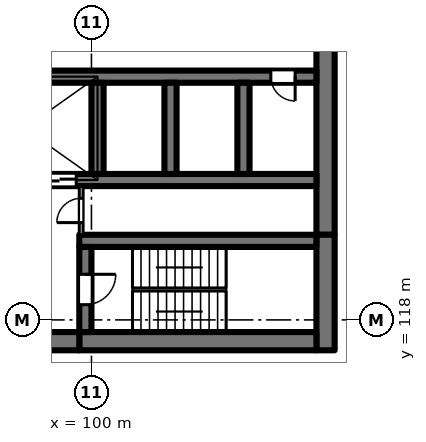
"""IFC4 building model, lengths in metres.
Left out: names, types, materials, properties, quantities, classifications, styles, units other than length and angle.
Written with IfcOpenShell. Run it as: python <this file> out.ifc"""

import sys

from ifc_helpers import new_model, si_unit, direction, frame, frame_2d, origin, place, context, subcontext, project, spatial, rectangle, extrude, element, fill, save


model = new_model("IFC4")
c1 = context("Model", 3, precision=1e-05, world=origin(), true_north=direction((0.0, 1.0)))
c2 = subcontext(c1, "Body", "Model", "MODEL_VIEW")
j1 = project(units=[si_unit("LENGTHUNIT", "METRE"), si_unit("PLANEANGLEUNIT", "RADIAN")], contexts=[c1])
p1 = place(None, origin())
s1 = spatial("IfcSite", under=j1, at=p1, CompositionType="ELEMENT")
p2 = place(p1, origin())
s2 = spatial("IfcBuilding", under=s1, at=p2, CompositionType="ELEMENT")
p3 = place(p2, frame((0.0, 0.0, 89.0)))
s3 = spatial("IfcBuildingStorey", under=s2, at=p3, CompositionType="ELEMENT", Elevation=89.0)
p4 = place(p3, frame((107.7, 135.2, 0.0), z_axis=(0.0, 0.0, 1.0), x_axis=(0.0, -1.0, 0.0)))
e1 = element("IfcWall", 1, at=p4, inside=s3, PredefinedType="SHEAR", context=c2, shape_type="SweptSolid", body=[
    extrude(rectangle(XDim=14.4, YDim=0.6, at=frame_2d((7.2, 0.0))), origin(), (0.0, 0.0, 1.0), 4.0),
])
p5 = place(p3, frame((107.7, 120.8, 0.0), z_axis=(0.0, 0.0, 1.0), x_axis=(0.0, -1.0, 0.0)))
e2 = element("IfcWall", 2, at=p5, inside=s3, PredefinedType="SHEAR", context=c2, shape_type="SweptSolid", body=[
    extrude(rectangle(XDim=3.8, YDim=0.6, at=frame_2d((1.9, 0.0))), origin(), (0.0, 0.0, 1.0), 4.0),
])
p6 = place(p3, frame((107.4, 117.3, 0.0), z_axis=(0.0, 0.0, 1.0), x_axis=(-1.0, 0.0, 0.0)))
e3 = element("IfcWall", 3, at=p6, inside=s3, PredefinedType="SHEAR", context=c2, shape_type="SweptSolid", body=[
    extrude(rectangle(XDim=7.8, YDim=0.6, at=frame_2d((3.9, 0.0))), origin(), (0.0, 0.0, 1.0), 4.0),
])
p7 = place(p3, frame((99.6, 117.3, 0.0), z_axis=(0.0, 0.0, 1.0), x_axis=(-1.0, 0.0, 0.0)))
e4 = element("IfcWall", 4, at=p7, inside=s3, PredefinedType="SHEAR", context=c2, shape_type="SweptSolid", body=[
    extrude(rectangle(XDim=8.925, YDim=0.6, at=frame_2d((4.462, 0.0))), origin(), (0.0, 0.0, 1.0), 4.0),
])
p8 = place(p3, frame((107.4, 120.6, 0.0), z_axis=(0.0, 0.0, 1.0), x_axis=(-1.0, 0.0, 0.0)))
e5 = element("IfcWall", 5, at=p8, inside=s3, PredefinedType="SHEAR", context=c2, shape_type="SweptSolid", body=[
    extrude(rectangle(XDim=7.8, YDim=0.4, at=frame_2d((3.9, 0.0))), origin(), (0.0, 0.0, 1.0), 4.0),
])
p9 = place(p3, frame((99.8, 120.4, 0.0), z_axis=(0.0, 0.0, 1.0), x_axis=(0.0, -1.0, 0.0)))
e6 = element("IfcWall", 6, at=p9, inside=s3, PredefinedType="SHEAR", context=c2, shape_type="SweptSolid", body=[
    extrude(rectangle(XDim=2.8, YDim=0.4, at=frame_2d((1.4, 0.0))), origin(), (0.0, 0.0, 1.0), 4.0),
])
p10 = place(p9, frame((0.9, 0.0, 0.0)))
e7 = element("IfcOpeningElement", 7, at=p10, cuts=e6, PredefinedType="OPENING", context=c2, shape_type="SweptSolid", body=[
    extrude(rectangle(XDim=1.0, YDim=2.1, at=frame_2d((0.5, 1.05))), frame((0.0, 0.21, 0.0), z_axis=(0.0, -1.0, 0.0), x_axis=(1.0, 0.0, 0.0)), (0.0, 0.0, 1.0), 0.42),
])
p11 = place(p3, frame((107.4, 126.0, 0.0), z_axis=(0.0, 0.0, 1.0), x_axis=(-1.0, 0.0, 0.0)))
e8 = element("IfcWall", 8, at=p11, inside=s3, PredefinedType="SHEAR", context=c2, shape_type="SweptSolid", body=[
    extrude(rectangle(XDim=12.2, YDim=0.4, at=frame_2d((6.1, 0.0))), origin(), (0.0, 0.0, 1.0), 4.0),
])
p12 = place(p11, frame((10.25, 0.0, 0.0)))
e9 = element("IfcOpeningElement", 9, at=p12, cuts=e8, PredefinedType="OPENING", context=c2, shape_type="SweptSolid", body=[
    extrude(rectangle(XDim=1.1, YDim=2.1, at=frame_2d((0.55, 1.05))), frame((0.0, 0.21, 0.0), z_axis=(0.0, -1.0, 0.0), x_axis=(1.0, 0.0, 0.0)), (0.0, 0.0, 1.0), 0.42),
])
p13 = place(p11, frame((0.7, 0.0, 0.0)))
e10 = element("IfcOpeningElement", 10, at=p13, cuts=e8, PredefinedType="OPENING", context=c2, shape_type="SweptSolid", body=[
    extrude(rectangle(XDim=0.8, YDim=2.1, at=frame_2d((0.4, 1.05))), frame((0.0, 0.21, 0.0), z_axis=(0.0, -1.0, 0.0), x_axis=(1.0, 0.0, 0.0)), (0.0, 0.0, 1.0), 0.42),
])
p14 = place(p3, frame((107.4, 122.6, 0.0), z_axis=(0.0, 0.0, 1.0), x_axis=(-1.0, 0.0, 0.0)))
e11 = element("IfcWall", 11, at=p14, inside=s3, PredefinedType="SHEAR", context=c2, shape_type="SweptSolid", body=[
    extrude(rectangle(XDim=12.2, YDim=0.4, at=frame_2d((6.1, 0.0))), origin(), (0.0, 0.0, 1.0), 4.0),
])
p15 = place(p14, frame((7.9, 0.0, 0.0)))
e12 = element("IfcOpeningElement", 12, at=p15, cuts=e11, PredefinedType="OPENING", context=c2, shape_type="SweptSolid", body=[
    extrude(rectangle(XDim=1.1, YDim=2.1, at=frame_2d((0.55, 1.05))), frame((0.0, 0.21, 0.0), z_axis=(0.0, -1.0, 0.0), x_axis=(1.0, 0.0, 0.0)), (0.0, 0.0, 1.0), 0.42),
])
for number, where, z_axis, x_axis in (
    (13, (105.0, 125.8, 0.0), (0.0, 0.0, 1.0), (0.0, -1.0, 0.0)),
    (14, (102.6, 125.8, 0.0), (0.0, 0.0, 1.0), (0.0, -1.0, 0.0)),
    (15, (100.2, 125.8, 0.0), (0.0, 0.0, 1.0), (0.0, -1.0, 0.0)),
):
    element("IfcWall", number, at=place(p3, frame(where, z_axis=z_axis, x_axis=x_axis)), inside=s3, PredefinedType="SHEAR", context=c2, shape_type="SweptSolid", body=[
        extrude(rectangle(XDim=3.0, YDim=0.4, at=frame_2d((1.5, 0.0))), origin(), (0.0, 0.0, 1.0), 4.0),
    ])
p16 = place(p3, frame((99.663, 120.8, 0.0), z_axis=(0.0, 0.0, 1.0), x_axis=(0.0, 1.0, 0.0)))
e16 = element("IfcWall", 16, at=p16, inside=s3, PredefinedType="PARTITIONING", context=c2, shape_type="SweptSolid", body=[
    extrude(rectangle(XDim=1.6, YDim=0.125, at=frame_2d((0.8, 0.0))), origin(), (0.0, 0.0, 1.0), 3.625),
])
p17 = place(p16, frame((0.4, 0.0, 0.0)))
e17 = element("IfcOpeningElement", 17, at=p17, cuts=e16, PredefinedType="OPENING", context=c2, shape_type="SweptSolid", body=[
    extrude(rectangle(XDim=0.8, YDim=2.1, at=frame_2d((0.4, 1.05))), frame((0.0, 0.073, 0.0), z_axis=(0.0, -1.0, 0.0), x_axis=(1.0, 0.0, 0.0)), (0.0, 0.0, 1.0), 0.145),
])
p18 = place(p13, origin())
e18 = element("IfcDoor", 18, at=p18, inside=s3, OperationType="SINGLE_SWING_LEFT", PredefinedType="DOOR", context=c2, shape_type="SweptSolid", body=[
    extrude(rectangle(XDim=0.8, YDim=2.1, at=frame_2d((0.4, 1.05))), frame((0.0, 0.025, 0.0), z_axis=(0.0, -1.0, 0.0), x_axis=(1.0, 0.0, 0.0)), (0.0, 0.0, 1.0), 0.05),
])
fill(e10, e18)
p19 = place(p10, origin())
e19 = element("IfcDoor", 19, at=p19, inside=s3, OperationType="SINGLE_SWING_LEFT", PredefinedType="DOOR", context=c2, shape_type="SweptSolid", body=[
    extrude(rectangle(XDim=1.0, YDim=2.1, at=frame_2d((0.5, 1.05))), frame((0.0, 0.025, 0.0), z_axis=(0.0, -1.0, 0.0), x_axis=(1.0, 0.0, 0.0)), (0.0, 0.0, 1.0), 0.05),
])
fill(e7, e19)
p20 = place(p17, origin())
e20 = element("IfcDoor", 20, at=p20, inside=s3, OperationType="SINGLE_SWING_RIGHT", PredefinedType="DOOR", context=c2, shape_type="SweptSolid", body=[
    extrude(rectangle(XDim=0.8, YDim=2.1, at=frame_2d((0.4, 1.05))), frame((0.0, 0.025, 0.0), z_axis=(0.0, -1.0, 0.0), x_axis=(1.0, 0.0, 0.0)), (0.0, 0.0, 1.0), 0.05),
])
fill(e17, e20)
p21 = place(p15, origin())
e21 = element("IfcDoor", 21, at=p21, inside=s3, OperationType="DOUBLE_DOOR_SLIDING", PredefinedType="DOOR", context=c2, shape_type="SweptSolid", body=[
    extrude(rectangle(XDim=1.1, YDim=2.1, at=frame_2d((0.55, 1.05))), frame((0.0, 0.025, 0.0), z_axis=(0.0, -1.0, 0.0), x_axis=(1.0, 0.0, 0.0)), (0.0, 0.0, 1.0), 0.05),
])
fill(e12, e21)
save(model, sys.argv[1])
